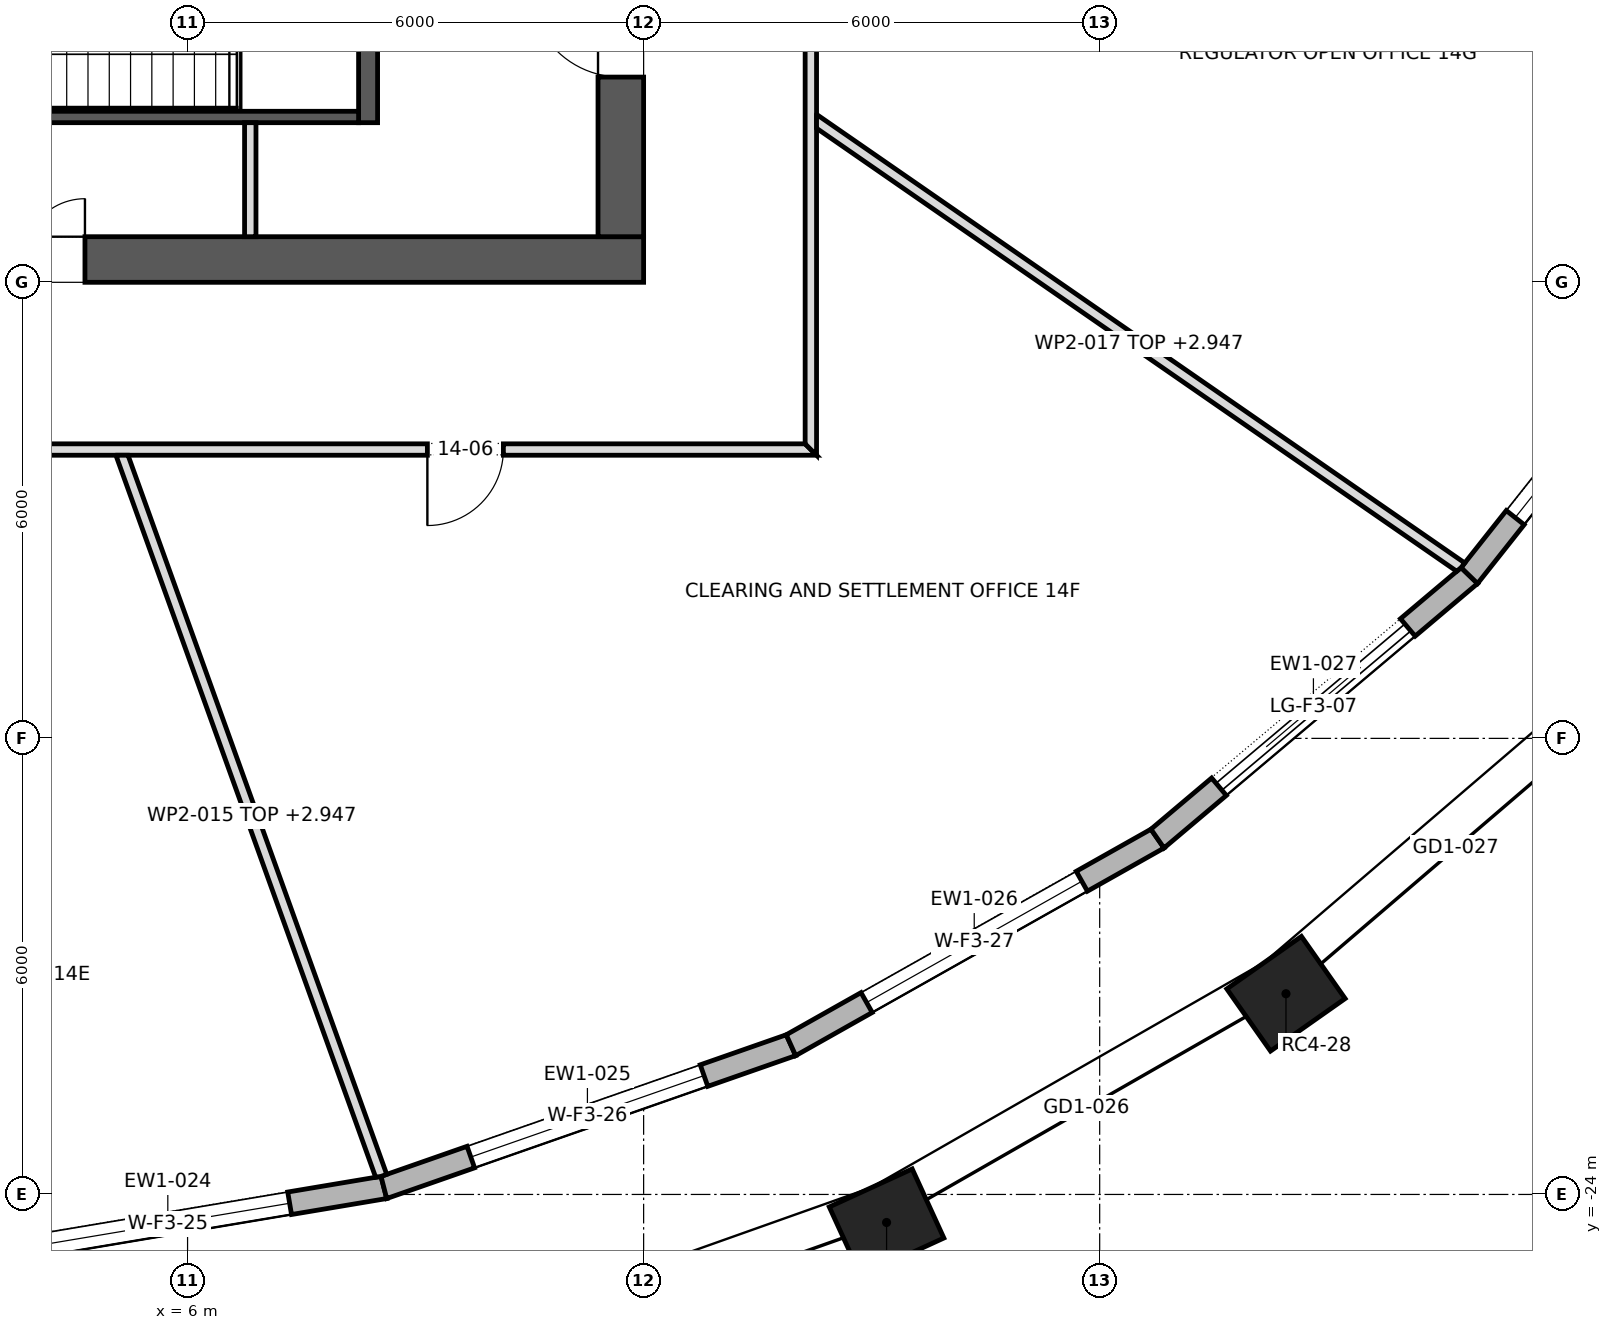
"""IFC4 building model, lengths in metres.
Left out: names, types, materials, properties, quantities, classifications, styles, units other than length and angle.
Written with IfcOpenShell. Run it as: python <this file> out.ifc"""

import sys

from ifc_helpers import new_model, si_unit, direction, frame, frame_2d, origin, origin_2d, place, context, subcontext, project, spatial, polyline, rectangle, outline, extrude, element, fill, save


model = new_model("IFC4")
c1 = context("Model", 3, precision=1e-05, world=origin(), true_north=direction((0.0, 1.0)))
c2 = subcontext(c1, "Body", "Model", "MODEL_VIEW")
j1 = project(units=[si_unit("LENGTHUNIT", "METRE"), si_unit("PLANEANGLEUNIT", "RADIAN")], contexts=[c1])
p1 = place(None, origin())
s1 = spatial("IfcSite", under=j1, at=p1, CompositionType="ELEMENT")
p2 = place(p1, origin())
s2 = spatial("IfcBuilding", under=s1, at=p2, CompositionType="ELEMENT")
p3 = place(p2, frame((0.0, 0.0, 202.9)))
s3 = spatial("IfcBuildingStorey", under=s2, at=p3, CompositionType="ELEMENT", Elevation=202.9)
for number, where, z_axis, x_axis in (
    (1, (15.196, -24.369, 0.0), (0.0, 0.0, 1.0), (0.909, 0.417, 0.0)),
    (2, (20.451, -21.359, 0.0), (0.0, 0.0, 1.0), (0.818, 0.575, 0.0)),
):
    element("IfcColumn", number, at=place(p3, frame(where, z_axis=z_axis, x_axis=x_axis)), inside=s3, PredefinedType="COLUMN", context=c2, shape_type="SweptSolid", body=[
        extrude(rectangle(XDim=1.2, YDim=1.0, at=origin_2d()), origin(), (0.0, 0.0, 1.0), 4.0),
    ])
p4 = place(p3, frame((-12.0, -11.7, 0.0), z_axis=(0.0, 0.0, 1.0), x_axis=(1.0, 0.0, 0.0)))
e3 = element("IfcWall", 3, at=p4, inside=s3, PredefinedType="SHEAR", context=c2, shape_type="SweptSolid", body=[
    extrude(rectangle(XDim=24.0, YDim=0.6, at=frame_2d((12.0, 0.0))), origin(), (0.0, 0.0, 1.0), 4.0),
])
p5 = place(p4, frame((9.975, 0.0, 0.0)))
e4 = element("IfcOpeningElement", 4, at=p5, cuts=e3, PredefinedType="OPENING", context=c2, shape_type="SweptSolid", body=[
    extrude(rectangle(XDim=0.9, YDim=2.1, at=frame_2d((0.45, 1.05))), frame((0.0, 0.312, 0.0), z_axis=(0.0, -1.0, 0.0), x_axis=(1.0, 0.0, 0.0)), (0.0, 0.0, 1.0), 0.624),
])
p6 = place(p4, frame((3.8, 0.0, 0.0)))
e5 = element("IfcOpeningElement", 5, at=p6, cuts=e3, PredefinedType="OPENING", context=c2, shape_type="SweptSolid", body=[
    extrude(rectangle(XDim=0.8, YDim=2.1, at=frame_2d((0.4, 1.05))), frame((0.0, 0.312, 0.0), z_axis=(0.0, -1.0, 0.0), x_axis=(1.0, 0.0, 0.0)), (0.0, 0.0, 1.0), 0.624),
])
p7 = place(p4, frame((5.8, 0.0, 0.0)))
e6 = element("IfcOpeningElement", 6, at=p7, cuts=e3, PredefinedType="OPENING", context=c2, shape_type="SweptSolid", body=[
    extrude(rectangle(XDim=0.8, YDim=2.1, at=frame_2d((0.4, 1.05))), frame((0.0, 0.312, 0.0), z_axis=(0.0, -1.0, 0.0), x_axis=(1.0, 0.0, 0.0)), (0.0, 0.0, 1.0), 0.624),
])
p8 = place(p4, frame((7.5, 0.0, 0.0)))
e7 = element("IfcOpeningElement", 7, at=p8, cuts=e3, PredefinedType="OPENING", context=c2, shape_type="SweptSolid", body=[
    extrude(rectangle(XDim=0.8, YDim=2.1, at=frame_2d((0.4, 1.05))), frame((0.0, 0.312, 0.0), z_axis=(0.0, -1.0, 0.0), x_axis=(1.0, 0.0, 0.0)), (0.0, 0.0, 1.0), 0.624),
])
p9 = place(p4, frame((15.85, 0.0, 0.0)))
e8 = element("IfcOpeningElement", 8, at=p9, cuts=e3, PredefinedType="OPENING", context=c2, shape_type="SweptSolid", body=[
    extrude(rectangle(XDim=0.8, YDim=2.1, at=frame_2d((0.4, 1.05))), frame((0.0, 0.312, 0.0), z_axis=(0.0, -1.0, 0.0), x_axis=(1.0, 0.0, 0.0)), (0.0, 0.0, 1.0), 0.624),
])
p10 = place(p3, frame((11.7, -11.4, 0.0), z_axis=(0.0, 0.0, 1.0), x_axis=(0.0, 1.0, 0.0)))
e9 = element("IfcWall", 9, at=p10, inside=s3, PredefinedType="SHEAR", context=c2, shape_type="SweptSolid", body=[
    extrude(rectangle(XDim=22.8, YDim=0.6, at=frame_2d((11.4, 0.0))), origin(), (0.0, 0.0, 1.0), 4.0),
])
p11 = place(p10, frame((10.2, 0.0, 0.0)))
e10 = element("IfcOpeningElement", 10, at=p11, cuts=e9, PredefinedType="OPENING", context=c2, shape_type="SweptSolid", body=[
    extrude(rectangle(XDim=2.4, YDim=2.1, at=frame_2d((1.2, 1.05))), frame((0.0, 0.312, 0.0), z_axis=(0.0, -1.0, 0.0), x_axis=(1.0, 0.0, 0.0)), (0.0, 0.0, 1.0), 0.624),
])
p12 = place(p10, frame((19.5, 0.0, 0.0)))
e11 = element("IfcOpeningElement", 11, at=p12, cuts=e9, PredefinedType="OPENING", context=c2, shape_type="SweptSolid", body=[
    extrude(rectangle(XDim=1.2, YDim=2.1, at=frame_2d((0.6, 1.05))), frame((0.0, 0.312, 0.0), z_axis=(0.0, -1.0, 0.0), x_axis=(1.0, 0.0, 0.0)), (0.0, 0.0, 1.0), 0.624),
])
p13 = place(p10, frame((2.1, 0.0, 0.0)))
e12 = element("IfcOpeningElement", 12, at=p13, cuts=e9, PredefinedType="OPENING", context=c2, shape_type="SweptSolid", body=[
    extrude(rectangle(XDim=1.2, YDim=2.1, at=frame_2d((0.6, 1.05))), frame((0.0, 0.312, 0.0), z_axis=(0.0, -1.0, 0.0), x_axis=(1.0, 0.0, 0.0)), (0.0, 0.0, 1.0), 0.624),
])
p14 = place(p3, frame((2.898, -24.862, 0.0), z_axis=(0.0, 0.0, 1.0), x_axis=(0.98622052717, 0.165436005116, 0.0)))
e13 = element("IfcWall", 13, at=p14, inside=s3, PredefinedType="STANDARD", context=c2, shape_type="SweptSolid", body=[
    extrude(outline(polyline([(-0.012, -0.15), (5.777, -0.15), (5.751, 0.15), (0.012, 0.15), (-0.012, -0.15)])), origin(), (0.0, 0.0, 1.0), 3.7),
])
p15 = place(p14, frame((1.257, 0.0, 0.6)))
e14 = element("IfcOpeningElement", 14, at=p15, cuts=e13, PredefinedType="OPENING", context=c2, shape_type="SweptSolid", body=[
    extrude(rectangle(XDim=3.25, YDim=2.65, at=frame_2d((1.625, 1.325))), frame((0.0, 0.162, 0.0), z_axis=(0.0, -1.0, 0.0), x_axis=(1.0, 0.0, 0.0)), (0.0, 0.0, 1.0), 0.324),
])
p16 = place(p3, frame((8.583, -23.908, 0.0), z_axis=(0.0, 0.0, 1.0), x_axis=(0.944023272224, 0.329878858824, 0.0)))
e15 = element("IfcWall", 15, at=p16, inside=s3, PredefinedType="STANDARD", context=c2, shape_type="SweptSolid", body=[
    extrude(outline(polyline([(-0.013, -0.15), (5.687, -0.15), (5.66, 0.15), (0.013, 0.15), (-0.013, -0.15)])), origin(), (0.0, 0.0, 1.0), 3.7),
])
p17 = place(p16, frame((1.212, 0.0, 0.6)))
e16 = element("IfcOpeningElement", 16, at=p17, cuts=e15, PredefinedType="OPENING", context=c2, shape_type="SweptSolid", body=[
    extrude(rectangle(XDim=3.25, YDim=2.65, at=frame_2d((1.625, 1.325))), frame((0.0, 0.162, 0.0), z_axis=(0.0, -1.0, 0.0), x_axis=(1.0, 0.0, 0.0)), (0.0, 0.0, 1.0), 0.324),
])
p18 = place(p3, frame((13.938, -22.037, 0.0), z_axis=(0.0, 0.0, 1.0), x_axis=(0.871140546168, 0.491033755278, 0.0)))
e17 = element("IfcWall", 17, at=p18, inside=s3, PredefinedType="STANDARD", context=c2, shape_type="SweptSolid", body=[
    extrude(outline(polyline([(-0.013, -0.15), (5.55, -0.15), (5.521, 0.15), (0.013, 0.15), (-0.013, -0.15)])), origin(), (0.0, 0.0, 1.0), 3.7),
])
p19 = place(p18, frame((1.143, 0.0, 0.6)))
e18 = element("IfcOpeningElement", 18, at=p19, cuts=e17, PredefinedType="OPENING", context=c2, shape_type="SweptSolid", body=[
    extrude(rectangle(XDim=3.25, YDim=2.65, at=frame_2d((1.625, 1.325))), frame((0.0, 0.162, 0.0), z_axis=(0.0, -1.0, 0.0), x_axis=(1.0, 0.0, 0.0)), (0.0, 0.0, 1.0), 0.324),
])
p20 = place(p3, frame((18.76, -19.319, 0.0), z_axis=(0.0, 0.0, 1.0), x_axis=(0.764386053229, 0.6447588399, 0.0)))
e19 = element("IfcWall", 19, at=p20, inside=s3, PredefinedType="STANDARD", context=c2, shape_type="SweptSolid", body=[
    extrude(outline(polyline([(-0.014, -0.15), (5.383, -0.15), (5.352, 0.15), (0.014, 0.15), (-0.014, -0.15)])), origin(), (0.0, 0.0, 1.0), 3.7),
])
p21 = place(p20, frame((1.059, 0.0, 0.0)))
e20 = element("IfcOpeningElement", 20, at=p21, cuts=e19, PredefinedType="OPENING", context=c2, shape_type="SweptSolid", body=[
    extrude(rectangle(XDim=3.25, YDim=3.25, at=frame_2d((1.625, 1.625))), frame((0.0, 0.162, 0.0), z_axis=(0.0, -1.0, 0.0), x_axis=(1.0, 0.0, 0.0)), (0.0, 0.0, 1.0), 0.324),
])
p22 = place(p3, frame((22.863, -15.858, 0.0), z_axis=(0.0, 0.0, 1.0), x_axis=(0.620870264345, 0.783913333763, 0.0)))
e21 = element("IfcWall", 21, at=p22, inside=s3, PredefinedType="STANDARD", context=c2, shape_type="SweptSolid", body=[
    extrude(outline(polyline([(-0.015, -0.15), (5.211, -0.15), (5.178, 0.15), (0.015, 0.15), (-0.015, -0.15)])), origin(), (0.0, 0.0, 1.0), 3.7),
])
p23 = place(p22, frame((0.972, 0.0, 0.6)))
e22 = element("IfcOpeningElement", 22, at=p23, cuts=e21, PredefinedType="OPENING", context=c2, shape_type="SweptSolid", body=[
    extrude(rectangle(XDim=3.25, YDim=2.65, at=frame_2d((1.625, 1.325))), frame((0.0, 0.162, 0.0), z_axis=(0.0, -1.0, 0.0), x_axis=(1.0, 0.0, 0.0)), (0.0, 0.0, 1.0), 0.324),
])
p24 = place(p3, frame((8.375, -9.9, 0.0), z_axis=(0.0, 0.0, 1.0), x_axis=(0.0, 1.0, 0.0)))
e23 = element("IfcWall", 23, at=p24, inside=s3, PredefinedType="SHEAR", context=c2, shape_type="SweptSolid", body=[
    extrude(rectangle(XDim=3.4, YDim=0.25, at=frame_2d((1.7, 0.0))), origin(), (0.0, 0.0, 1.0), 3.7),
])
p25 = place(p24, frame((1.175, 0.0, 0.0)))
e24 = element("IfcOpeningElement", 24, at=p25, cuts=e23, PredefinedType="OPENING", context=c2, shape_type="SweptSolid", body=[
    extrude(rectangle(XDim=1.2, YDim=2.1, at=frame_2d((0.6, 1.05))), frame((0.0, 0.137, 0.0), z_axis=(0.0, -1.0, 0.0), x_axis=(1.0, 0.0, 0.0)), (0.0, 0.0, 1.0), 0.274),
])
p26 = place(p3, frame((0.25, -9.825, 0.0), z_axis=(0.0, 0.0, 1.0), x_axis=(1.0, 0.0, 0.0)))
e25 = element("IfcWall", 25, at=p26, inside=s3, PredefinedType="SHEAR", context=c2, shape_type="SweptSolid", body=[
    extrude(rectangle(XDim=8.0, YDim=0.15, at=frame_2d((4.0, 0.0))), origin(), (0.0, 0.0, 1.0), 3.7),
])
p27 = place(p3, frame((6.825, -11.4, 0.0), z_axis=(0.0, 0.0, 1.0), x_axis=(0.0, 1.0, 0.0)))
e26 = element("IfcWall", 26, at=p27, inside=s3, PredefinedType="PARTITIONING", context=c2, shape_type="SweptSolid", body=[
    extrude(rectangle(XDim=1.5, YDim=0.15, at=frame_2d((0.75, 0.0))), origin(), (0.0, 0.0, 1.0), 3.7),
])
p28 = place(p3, frame((-14.275, -14.2, 0.0), z_axis=(0.0, 0.0, 1.0), x_axis=(1.0, 0.0, 0.0)))
e27 = element("IfcWall", 27, at=p28, inside=s3, PredefinedType="PARTITIONING", context=c2, shape_type="SweptSolid", body=[
    extrude(outline(polyline([(28.55, -0.075), (28.55, -0.075), (28.4, 0.075), (26.517, 0.075), (24.633, 0.075), (22.75, 0.075), (20.866, 0.075), (18.983, 0.075), (17.1, 0.075), (15.217, 0.075), (13.333, 0.075), (11.45, 0.075), (9.567, 0.075), (7.683, 0.075), (5.8, 0.075), (3.917, 0.075), (2.033, 0.075), (0.15, 0.075), (0.0, -0.075), (1.903, -0.075), (3.807, -0.075), (5.71, -0.075), (7.613, -0.075), (9.517, -0.075), (11.42, -0.075), (13.323, -0.075), (15.227, -0.075), (17.13, -0.075), (19.033, -0.075), (20.937, -0.075), (22.84, -0.075), (24.743, -0.075), (26.646, -0.075), (28.55, -0.075)])), origin(), (0.0, 0.0, 1.0), 3.7),
])
p29 = place(p28, frame((3.72, 0.0, 0.0)))
e28 = element("IfcOpeningElement", 28, at=p29, cuts=e27, PredefinedType="OPENING", context=c2, shape_type="SweptSolid", body=[
    extrude(rectangle(XDim=1.8, YDim=2.1, at=frame_2d((0.9, 1.05))), frame((0.0, 0.087, 0.0), z_axis=(0.0, -1.0, 0.0), x_axis=(1.0, 0.0, 0.0)), (0.0, 0.0, 1.0), 0.174),
])
p30 = place(p28, frame((13.775, 0.0, 0.0)))
e29 = element("IfcOpeningElement", 29, at=p30, cuts=e27, PredefinedType="OPENING", context=c2, shape_type="SweptSolid", body=[
    extrude(rectangle(XDim=1.0, YDim=2.1, at=frame_2d((0.5, 1.05))), frame((0.0, 0.087, 0.0), z_axis=(0.0, -1.0, 0.0), x_axis=(1.0, 0.0, 0.0)), (0.0, 0.0, 1.0), 0.174),
])
p31 = place(p28, frame((23.43, 0.0, 0.0)))
e30 = element("IfcOpeningElement", 30, at=p31, cuts=e27, PredefinedType="OPENING", context=c2, shape_type="SweptSolid", body=[
    extrude(rectangle(XDim=1.0, YDim=2.1, at=frame_2d((0.5, 1.05))), frame((0.0, 0.087, 0.0), z_axis=(0.0, -1.0, 0.0), x_axis=(1.0, 0.0, 0.0)), (0.0, 0.0, 1.0), 0.174),
])
p32 = place(p3, frame((5.128, -14.25, 0.0), z_axis=(0.0, 0.0, 1.0), x_axis=(0.338529589418, -0.940955746615, 0.0)))
e31 = element("IfcWall", 31, at=p32, inside=s3, PredefinedType="PARTITIONING", context=c2, shape_type="SweptSolid", body=[
    extrude(outline(polyline([(0.0, -0.075), (1.682, -0.075), (3.365, -0.075), (5.047, -0.075), (6.73, -0.075), (8.412, -0.075), (10.095, -0.075), (10.107, -0.005), (10.108, 0.072), (10.108, 0.075), (8.432, 0.075), (6.757, 0.075), (5.081, 0.075), (3.405, 0.075), (1.729, 0.075), (0.053, 0.075), (0.0, -0.074), (0.0, -0.075)])), origin(), (0.0, 0.0, 1.0), 2.947),
])
p33 = place(p3, frame((14.2, -14.275, 0.0), z_axis=(0.0, 0.0, 1.0), x_axis=(0.0, 1.0, 0.0)))
e32 = element("IfcWall", 32, at=p33, inside=s3, PredefinedType="PARTITIONING", context=c2, shape_type="SweptSolid", body=[
    extrude(outline(polyline([(0.0, -0.075), (1.859, -0.075), (3.718, -0.075), (5.577, -0.075), (7.436, -0.075), (9.295, -0.075), (11.155, -0.075), (13.013, -0.075), (13.177, 0.075), (11.315, 0.075), (9.455, 0.075), (7.594, 0.075), (5.733, 0.075), (3.872, 0.075), (2.011, 0.075), (0.15, 0.075), (0.0, -0.075)])), origin(), (0.0, 0.0, 1.0), 3.7),
])
p34 = place(p3, frame((14.232, -9.853, 0.0), z_axis=(0.0, 0.0, 1.0), x_axis=(0.822298116352, -0.569056946047, 0.0)))
e33 = element("IfcWall", 33, at=p34, inside=s3, PredefinedType="PARTITIONING", context=c2, shape_type="SweptSolid", body=[
    extrude(outline(polyline([(0.104, -0.075), (1.811, -0.075), (3.518, -0.075), (5.225, -0.075), (6.932, -0.075), (8.639, -0.075), (10.346, -0.075), (10.366, -0.002), (10.37, 0.07), (10.37, 0.075), (8.642, 0.075), (6.914, 0.075), (5.185, 0.075), (3.457, 0.075), (1.729, 0.075), (0.0, 0.075), (0.0, 0.075), (0.104, -0.075)])), origin(), (0.0, 0.0, 1.0), 2.947),
])
p35 = place(p15, origin())
e34 = element("IfcWindow", 34, at=p35, inside=s3, PartitioningType="TRIPLE_PANEL_VERTICAL", PredefinedType="WINDOW", context=c2, shape_type="SweptSolid", body=[
    extrude(rectangle(XDim=3.25, YDim=2.65, at=frame_2d((1.625, 1.325))), frame((0.0, 0.03, 0.0), z_axis=(0.0, -1.0, 0.0), x_axis=(1.0, 0.0, 0.0)), (0.0, 0.0, 1.0), 0.06),
])
fill(e14, e34)
p36 = place(p17, origin())
e35 = element("IfcWindow", 35, at=p36, inside=s3, PartitioningType="TRIPLE_PANEL_VERTICAL", PredefinedType="WINDOW", context=c2, shape_type="SweptSolid", body=[
    extrude(rectangle(XDim=3.25, YDim=2.65, at=frame_2d((1.625, 1.325))), frame((0.0, 0.03, 0.0), z_axis=(0.0, -1.0, 0.0), x_axis=(1.0, 0.0, 0.0)), (0.0, 0.0, 1.0), 0.06),
])
fill(e16, e35)
p37 = place(p19, origin())
e36 = element("IfcWindow", 36, at=p37, inside=s3, PartitioningType="TRIPLE_PANEL_VERTICAL", PredefinedType="WINDOW", context=c2, shape_type="SweptSolid", body=[
    extrude(rectangle(XDim=3.25, YDim=2.65, at=frame_2d((1.625, 1.325))), frame((0.0, 0.03, 0.0), z_axis=(0.0, -1.0, 0.0), x_axis=(1.0, 0.0, 0.0)), (0.0, 0.0, 1.0), 0.06),
])
fill(e18, e36)
p38 = place(p21, origin())
e37 = element("IfcDoor", 37, at=p38, inside=s3, OperationType="DOUBLE_DOOR_SLIDING", PredefinedType="DOOR", context=c2, shape_type="SweptSolid", body=[
    extrude(rectangle(XDim=3.25, YDim=3.25, at=frame_2d((1.625, 1.625))), frame((0.0, 0.025, 0.0), z_axis=(0.0, -1.0, 0.0), x_axis=(1.0, 0.0, 0.0)), (0.0, 0.0, 1.0), 0.05),
])
fill(e20, e37)
p39 = place(p23, origin())
e38 = element("IfcWindow", 38, at=p39, inside=s3, PartitioningType="TRIPLE_PANEL_VERTICAL", PredefinedType="WINDOW", context=c2, shape_type="SweptSolid", body=[
    extrude(rectangle(XDim=3.25, YDim=2.65, at=frame_2d((1.625, 1.325))), frame((0.0, 0.03, 0.0), z_axis=(0.0, -1.0, 0.0), x_axis=(1.0, 0.0, 0.0)), (0.0, 0.0, 1.0), 0.06),
])
fill(e22, e38)
p40 = place(p13, origin())
e39 = element("IfcDoor", 39, at=p40, inside=s3, OperationType="SINGLE_SWING_LEFT", PredefinedType="DOOR", context=c2, shape_type="SweptSolid", body=[
    extrude(rectangle(XDim=1.2, YDim=2.1, at=frame_2d((0.6, 1.05))), frame((0.0, 0.025, 0.0), z_axis=(0.0, -1.0, 0.0), x_axis=(1.0, 0.0, 0.0)), (0.0, 0.0, 1.0), 0.05),
])
fill(e12, e39)
p41 = place(p9, origin())
e40 = element("IfcDoor", 40, at=p41, inside=s3, OperationType="SINGLE_SWING_LEFT", PredefinedType="DOOR", context=c2, shape_type="SweptSolid", body=[
    extrude(rectangle(XDim=0.8, YDim=2.1, at=frame_2d((0.4, 1.05))), frame((0.0, 0.025, 0.0), z_axis=(0.0, -1.0, 0.0), x_axis=(1.0, 0.0, 0.0)), (0.0, 0.0, 1.0), 0.05),
])
fill(e8, e40)
p42 = place(p31, frame((1.0, 0.0, 0.0), z_axis=(0.0, 0.0, 1.0), x_axis=(-1.0, 0.0, 0.0)))
e41 = element("IfcDoor", 41, at=p42, inside=s3, OperationType="SINGLE_SWING_LEFT", PredefinedType="DOOR", context=c2, shape_type="SweptSolid", body=[
    extrude(rectangle(XDim=1.0, YDim=2.1, at=frame_2d((0.5, 1.05))), frame((0.0, 0.025, 0.0), z_axis=(0.0, -1.0, 0.0), x_axis=(1.0, 0.0, 0.0)), (0.0, 0.0, 1.0), 0.05),
])
fill(e30, e41)
save(model, sys.argv[1])
